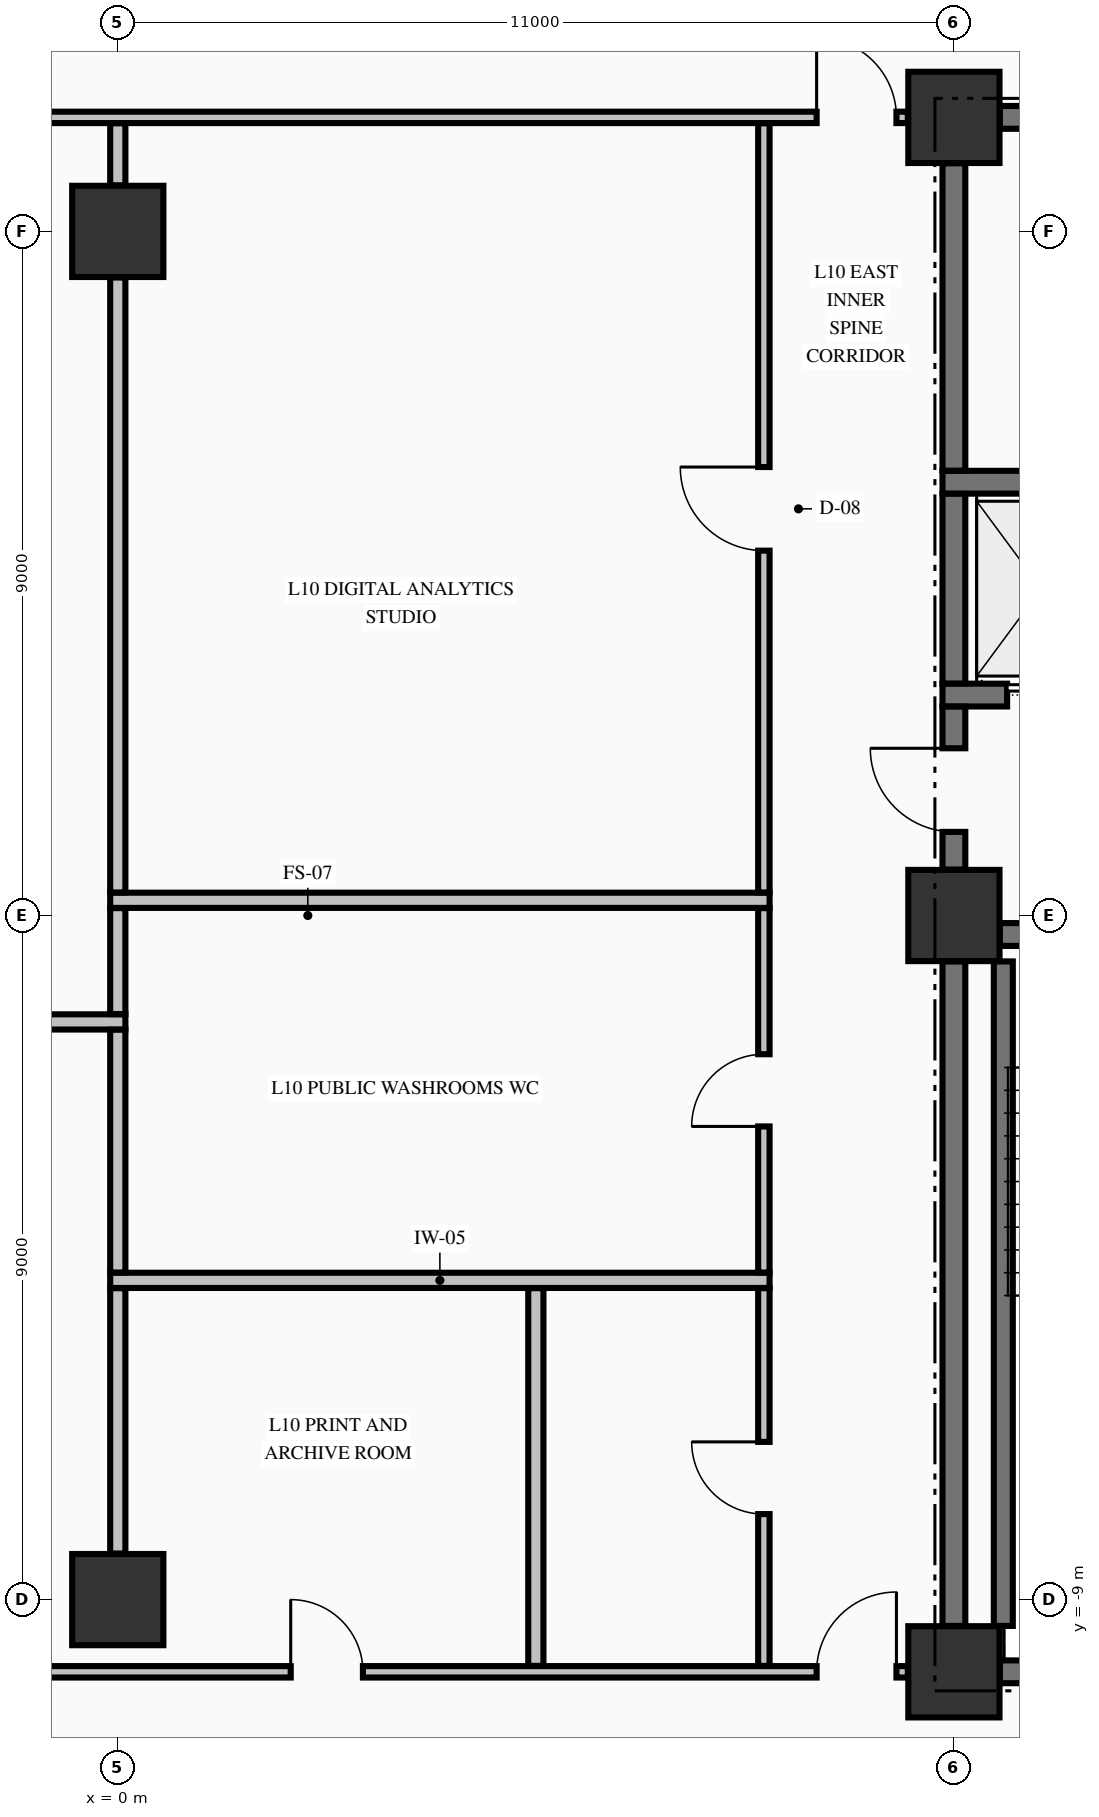
"""IFC4 building model, lengths in metres.
Left out: names, types, materials, properties, quantities, classifications, styles, units other than length and angle.
Written with IfcOpenShell. Run it as: python <this file> out.ifc"""

import sys

from ifc_helpers import new_model, si_unit, direction, frame, frame_2d, origin, origin_2d, place, context, subcontext, project, spatial, rectangle, extrude, element, fill, save


model = new_model("IFC4")
c1 = context("Model", 3, precision=1e-05, world=origin(), true_north=direction((0.0, 1.0)))
c2 = subcontext(c1, "Body", "Model", "MODEL_VIEW")
j1 = project(units=[si_unit("LENGTHUNIT", "METRE"), si_unit("PLANEANGLEUNIT", "RADIAN")], contexts=[c1])
p1 = place(None, origin())
s1 = spatial("IfcSite", under=j1, at=p1, CompositionType="ELEMENT")
p2 = place(p1, origin())
s2 = spatial("IfcBuilding", under=s1, at=p2, CompositionType="ELEMENT")
p3 = place(p2, frame((0.0, 0.0, 45.05)))
s3 = spatial("IfcBuildingStorey", under=s2, at=p3, CompositionType="ELEMENT", Elevation=45.05)
for number, where, z_axis, x_axis in (
    (1, (11.0, -9.95, -0.25), (0.0, 0.0, 1.0), (1.0, 0.0, 0.0)),
    (2, (11.0, 0.0, -0.25), (0.0, 0.0, 1.0), (1.0, 0.0, 0.0)),
    (3, (11.0, 10.5, -0.25), (0.0, 0.0, 1.0), (1.0, 0.0, 0.0)),
    (4, (0.0, -9.0, -0.25), (0.0, 0.0, 1.0), (1.0, 0.0, 0.0)),
    (5, (0.0, 9.0, -0.25), (0.0, 0.0, 1.0), (1.0, 0.0, 0.0)),
):
    element("IfcColumn", number, at=place(p3, frame(where, z_axis=z_axis, x_axis=x_axis)), inside=s3, PredefinedType="COLUMN", context=c2, shape_type="SweptSolid", body=[
        extrude(rectangle(XDim=1.2, YDim=1.2, at=origin_2d()), origin(), (0.0, 0.0, 1.0), 3.57),
    ])
p4 = place(p3, frame((11.604, -9.95, 0.0), z_axis=(0.0, 0.0, 1.0), x_axis=(1.0, 0.0, 0.0)))
e6 = element("IfcWall", 6, at=p4, inside=s3, PredefinedType="SHEAR", context=c2, shape_type="SweptSolid", body=[
    extrude(rectangle(XDim=3.096, YDim=0.3, at=frame_2d((1.548, 0.0))), origin(), (0.0, 0.0, 1.0), 3.32),
])
p5 = place(p3, frame((11.604, -0.25, 0.0), z_axis=(0.0, 0.0, 1.0), x_axis=(1.0, 0.0, 0.0)))
e7 = element("IfcWall", 7, at=p5, inside=s3, PredefinedType="SHEAR", context=c2, shape_type="SweptSolid", body=[
    extrude(rectangle(XDim=3.271, YDim=0.3, at=frame_2d((1.635, 0.0))), origin(), (0.0, 0.0, 1.0), 3.32),
])
p6 = place(p5, frame((0.996, 0.0, 0.0)))
e8 = element("IfcOpeningElement", 8, at=p6, cuts=e7, PredefinedType="OPENING", context=c2, shape_type="SweptSolid", body=[
    extrude(rectangle(XDim=1.1, YDim=2.15, at=frame_2d((0.55, 1.075))), frame((0.0, 0.16, 0.0), z_axis=(0.0, -1.0, 0.0), x_axis=(1.0, 0.0, 0.0)), (0.0, 0.0, 1.0), 0.32),
])
p7 = place(p3, frame((10.85, 2.9, 0.0), z_axis=(0.0, 0.0, 1.0), x_axis=(1.0, 0.0, 0.0)))
e9 = element("IfcWall", 9, at=p7, inside=s3, PredefinedType="SHEAR", context=c2, shape_type="SweptSolid", body=[
    extrude(rectangle(XDim=4.025, YDim=0.3, at=frame_2d((2.012, 0.0))), origin(), (0.0, 0.0, 1.0), 3.32),
])
p8 = place(p7, frame((0.85, 0.0, 0.0)))
e10 = element("IfcOpeningElement", 10, at=p8, cuts=e9, PredefinedType="OPENING", context=c2, shape_type="SweptSolid", body=[
    extrude(rectangle(XDim=1.1, YDim=2.2, at=frame_2d((0.55, 1.1))), frame((0.0, 0.16, 0.0), z_axis=(0.0, -1.0, 0.0), x_axis=(1.0, 0.0, 0.0)), (0.0, 0.0, 1.0), 0.32),
])
p9 = place(p3, frame((10.85, 5.7, 0.0), z_axis=(0.0, 0.0, 1.0), x_axis=(1.0, 0.0, 0.0)))
e11 = element("IfcWall", 11, at=p9, inside=s3, PredefinedType="SHEAR", context=c2, shape_type="SweptSolid", body=[
    extrude(rectangle(XDim=4.025, YDim=0.3, at=frame_2d((2.012, 0.0))), origin(), (0.0, 0.0, 1.0), 3.32),
])
p10 = place(p3, frame((11.604, 10.5, 0.0), z_axis=(0.0, 0.0, 1.0), x_axis=(1.0, 0.0, 0.0)))
e12 = element("IfcWall", 12, at=p10, inside=s3, PredefinedType="SHEAR", context=c2, shape_type="SweptSolid", body=[
    extrude(rectangle(XDim=3.096, YDim=0.3, at=frame_2d((1.548, 0.0))), origin(), (0.0, 0.0, 1.0), 3.32),
])
p11 = place(p10, frame((1.371, 0.0, 0.0)))
e13 = element("IfcOpeningElement", 13, at=p11, cuts=e12, PredefinedType="OPENING", context=c2, shape_type="SweptSolid", body=[
    extrude(rectangle(XDim=0.95, YDim=2.15, at=frame_2d((0.475, 1.075))), frame((0.0, 0.16, 0.0), z_axis=(0.0, -1.0, 0.0), x_axis=(1.0, 0.0, 0.0)), (0.0, 0.0, 1.0), 0.32),
])
p12 = place(p3, frame((-10.394, -9.95, 0.0), z_axis=(0.0, 0.0, 1.0), x_axis=(1.0, 0.0, 0.0)))
e14 = element("IfcWall", 14, at=p12, inside=s3, PredefinedType="PARTITIONING", context=c2, shape_type="SweptSolid", body=[
    extrude(rectangle(XDim=20.788, YDim=0.15, at=frame_2d((10.394, 0.0))), origin(), (0.0, 0.0, 1.0), 3.32),
])
p13 = place(p12, frame((0.15, 0.0, 0.0)))
e15 = element("IfcOpeningElement", 15, at=p13, cuts=e14, PredefinedType="OPENING", context=c2, shape_type="SweptSolid", body=[
    extrude(rectangle(XDim=1.05, YDim=2.15, at=frame_2d((0.525, 1.075))), frame((0.0, 0.085, 0.0), z_axis=(0.0, -1.0, 0.0), x_axis=(1.0, 0.0, 0.0)), (0.0, 0.0, 1.0), 0.17),
])
p14 = place(p12, frame((19.588, 0.0, 0.0)))
e16 = element("IfcOpeningElement", 16, at=p14, cuts=e14, PredefinedType="OPENING", context=c2, shape_type="SweptSolid", body=[
    extrude(rectangle(XDim=1.05, YDim=2.15, at=frame_2d((0.525, 1.075))), frame((0.0, 0.085, 0.0), z_axis=(0.0, -1.0, 0.0), x_axis=(1.0, 0.0, 0.0)), (0.0, 0.0, 1.0), 0.17),
])
p15 = place(p12, frame((12.669, 0.0, 0.0)))
e17 = element("IfcOpeningElement", 17, at=p15, cuts=e14, PredefinedType="OPENING", context=c2, shape_type="SweptSolid", body=[
    extrude(rectangle(XDim=0.95, YDim=2.15, at=frame_2d((0.475, 1.075))), frame((0.0, 0.085, 0.0), z_axis=(0.0, -1.0, 0.0), x_axis=(1.0, 0.0, 0.0)), (0.0, 0.0, 1.0), 0.17),
])
for number, where, z_axis, x_axis in (
    (18, (-0.1, -4.8, 0.0), (0.0, 0.0, 1.0), (1.0, 0.0, 0.0)),
    (19, (-8.575, -1.4, 0.0), (0.0, 0.0, 1.0), (1.0, 0.0, 0.0)),
    (20, (-0.1, 0.2, 0.0), (0.0, 0.0, 1.0), (1.0, 0.0, 0.0)),
):
    element("IfcWall", number, at=place(p3, frame(where, z_axis=z_axis, x_axis=x_axis)), inside=s3, PredefinedType="PARTITIONING", context=c2, shape_type="SweptSolid", body=[
        extrude(rectangle(XDim=8.675, YDim=0.2, at=frame_2d((4.337, 0.0))), origin(), (0.0, 0.0, 1.0), 3.32),
    ])
p16 = place(p3, frame((-10.394, 10.5, 0.0), z_axis=(0.0, 0.0, 1.0), x_axis=(1.0, 0.0, 0.0)))
e21 = element("IfcWall", 21, at=p16, inside=s3, PredefinedType="PARTITIONING", context=c2, shape_type="SweptSolid", body=[
    extrude(rectangle(XDim=20.788, YDim=0.15, at=frame_2d((10.394, 0.0))), origin(), (0.0, 0.0, 1.0), 3.32),
])
p17 = place(p16, frame((0.15, 0.0, 0.0)))
e22 = element("IfcOpeningElement", 22, at=p17, cuts=e21, PredefinedType="OPENING", context=c2, shape_type="SweptSolid", body=[
    extrude(rectangle(XDim=1.05, YDim=2.15, at=frame_2d((0.525, 1.075))), frame((0.0, 0.085, 0.0), z_axis=(0.0, -1.0, 0.0), x_axis=(1.0, 0.0, 0.0)), (0.0, 0.0, 1.0), 0.17),
])
p18 = place(p16, frame((19.588, 0.0, 0.0)))
e23 = element("IfcOpeningElement", 23, at=p18, cuts=e21, PredefinedType="OPENING", context=c2, shape_type="SweptSolid", body=[
    extrude(rectangle(XDim=1.05, YDim=2.15, at=frame_2d((0.525, 1.075))), frame((0.0, 0.085, 0.0), z_axis=(0.0, -1.0, 0.0), x_axis=(1.0, 0.0, 0.0)), (0.0, 0.0, 1.0), 0.17),
])
p19 = place(p3, frame((11.0, -9.346, 0.0), z_axis=(0.0, 0.0, 1.0), x_axis=(0.0, 1.0, 0.0)))
e24 = element("IfcWall", 24, at=p19, inside=s3, PredefinedType="SHEAR", context=c2, shape_type="SweptSolid", body=[
    extrude(rectangle(XDim=8.742, YDim=0.3, at=frame_2d((4.371, 0.0))), origin(), (0.0, 0.0, 1.0), 3.32),
])
p20 = place(p3, frame((11.0, 0.604, 0.0), z_axis=(0.0, 0.0, 1.0), x_axis=(0.0, 1.0, 0.0)))
e25 = element("IfcWall", 25, at=p20, inside=s3, PredefinedType="SHEAR", context=c2, shape_type="SweptSolid", body=[
    extrude(rectangle(XDim=2.144, YDim=0.3, at=frame_2d((1.072, 0.0))), origin(), (0.0, 0.0, 1.0), 3.32),
])
p21 = place(p20, frame((0.496, 0.0, 0.0)))
e26 = element("IfcOpeningElement", 26, at=p21, cuts=e25, PredefinedType="OPENING", context=c2, shape_type="SweptSolid", body=[
    extrude(rectangle(XDim=1.1, YDim=2.15, at=frame_2d((0.55, 1.075))), frame((0.0, 0.16, 0.0), z_axis=(0.0, -1.0, 0.0), x_axis=(1.0, 0.0, 0.0)), (0.0, 0.0, 1.0), 0.32),
])
p22 = place(p3, frame((11.0, 3.052, 0.0), z_axis=(0.0, 0.0, 1.0), x_axis=(0.0, 1.0, 0.0)))
e27 = element("IfcWall", 27, at=p22, inside=s3, PredefinedType="SHEAR", context=c2, shape_type="SweptSolid", body=[
    extrude(rectangle(XDim=2.496, YDim=0.3, at=frame_2d((1.248, 0.0))), origin(), (0.0, 0.0, 1.0), 3.32),
])
p23 = place(p3, frame((11.0, 5.852, 0.0), z_axis=(0.0, 0.0, 1.0), x_axis=(0.0, 1.0, 0.0)))
e28 = element("IfcWall", 28, at=p23, inside=s3, PredefinedType="SHEAR", context=c2, shape_type="SweptSolid", body=[
    extrude(rectangle(XDim=4.044, YDim=0.3, at=frame_2d((2.022, 0.0))), origin(), (0.0, 0.0, 1.0), 3.32),
])
p24 = place(p3, frame((11.65, -9.346, 0.0), z_axis=(0.0, 0.0, 1.0), x_axis=(0.0, 1.0, 0.0)))
e29 = element("IfcWall", 29, at=p24, inside=s3, PredefinedType="SOLIDWALL", context=c2, shape_type="SweptSolid", body=[
    extrude(rectangle(XDim=8.742, YDim=0.25, at=frame_2d((4.371, 0.0))), origin(), (0.0, 0.0, 1.0), 3.32),
])
p25 = place(p3, frame((0.0, -8.394, 0.0), z_axis=(0.0, 0.0, 1.0), x_axis=(0.0, 1.0, 0.0)))
e30 = element("IfcWall", 30, at=p25, inside=s3, PredefinedType="PARTITIONING", context=c2, shape_type="SweptSolid", body=[
    extrude(rectangle(XDim=3.491, YDim=0.2, at=frame_2d((1.746, 0.0))), origin(), (0.0, 0.0, 1.0), 2.66),
])
p26 = place(p3, frame((0.0, -4.697, 0.0), z_axis=(0.0, 0.0, 1.0), x_axis=(0.0, 1.0, 0.0)))
e31 = element("IfcWall", 31, at=p26, inside=s3, PredefinedType="PARTITIONING", context=c2, shape_type="SweptSolid", body=[
    extrude(rectangle(XDim=3.194, YDim=0.2, at=frame_2d((1.597, 0.0))), origin(), (0.0, 0.0, 1.0), 2.66),
])
p27 = place(p3, frame((0.0, -1.297, 0.0), z_axis=(0.0, 0.0, 1.0), x_axis=(0.0, 1.0, 0.0)))
e32 = element("IfcWall", 32, at=p27, inside=s3, PredefinedType="PARTITIONING", context=c2, shape_type="SweptSolid", body=[
    extrude(rectangle(XDim=1.394, YDim=0.2, at=frame_2d((0.697, 0.0))), origin(), (0.0, 0.0, 1.0), 2.66),
])
p28 = place(p3, frame((0.0, 0.303, 0.0), z_axis=(0.0, 0.0, 1.0), x_axis=(0.0, 1.0, 0.0)))
e33 = element("IfcWall", 33, at=p28, inside=s3, PredefinedType="PARTITIONING", context=c2, shape_type="SweptSolid", body=[
    extrude(rectangle(XDim=8.091, YDim=0.2, at=frame_2d((4.045, 0.0))), origin(), (0.0, 0.0, 1.0), 2.66),
])
p29 = place(p3, frame((0.0, 9.606, 0.0), z_axis=(0.0, 0.0, 1.0), x_axis=(0.0, 1.0, 0.0)))
e34 = element("IfcWall", 34, at=p29, inside=s3, PredefinedType="PARTITIONING", context=c2, shape_type="SweptSolid", body=[
    extrude(rectangle(XDim=0.816, YDim=0.2, at=frame_2d((0.408, 0.0))), origin(), (0.0, 0.0, 1.0), 2.66),
])
p30 = place(p3, frame((5.5, -9.872, 0.0), z_axis=(0.0, 0.0, 1.0), x_axis=(0.0, 1.0, 0.0)))
e35 = element("IfcWall", 35, at=p30, inside=s3, PredefinedType="PARTITIONING", context=c2, shape_type="SweptSolid", body=[
    extrude(rectangle(XDim=4.969, YDim=0.2, at=frame_2d((2.484, 0.0))), origin(), (0.0, 0.0, 1.0), 3.32),
])
p31 = place(p3, frame((8.5, -9.872, 0.0), z_axis=(0.0, 0.0, 1.0), x_axis=(0.0, 1.0, 0.0)))
e36 = element("IfcWall", 36, at=p31, inside=s3, PredefinedType="PARTITIONING", context=c2, shape_type="SweptSolid", body=[
    extrude(rectangle(XDim=4.969, YDim=0.15, at=frame_2d((2.484, 0.0))), origin(), (0.0, 0.0, 1.0), 3.32),
])
p32 = place(p31, frame((1.997, 0.0, 0.0)))
e37 = element("IfcOpeningElement", 37, at=p32, cuts=e36, PredefinedType="OPENING", context=c2, shape_type="SweptSolid", body=[
    extrude(rectangle(XDim=0.95, YDim=2.15, at=frame_2d((0.475, 1.075))), frame((0.0, 0.085, 0.0), z_axis=(0.0, -1.0, 0.0), x_axis=(1.0, 0.0, 0.0)), (0.0, 0.0, 1.0), 0.17),
])
p33 = place(p3, frame((8.5, -4.697, 0.0), z_axis=(0.0, 0.0, 1.0), x_axis=(0.0, 1.0, 0.0)))
e38 = element("IfcWall", 38, at=p33, inside=s3, PredefinedType="PARTITIONING", context=c2, shape_type="SweptSolid", body=[
    extrude(rectangle(XDim=4.794, YDim=0.15, at=frame_2d((2.397, 0.0))), origin(), (0.0, 0.0, 1.0), 3.32),
])
p34 = place(p33, frame((1.922, 0.0, 0.0)))
e39 = element("IfcOpeningElement", 39, at=p34, cuts=e38, PredefinedType="OPENING", context=c2, shape_type="SweptSolid", body=[
    extrude(rectangle(XDim=0.95, YDim=2.15, at=frame_2d((0.475, 1.075))), frame((0.0, 0.085, 0.0), z_axis=(0.0, -1.0, 0.0), x_axis=(1.0, 0.0, 0.0)), (0.0, 0.0, 1.0), 0.17),
])
p35 = place(p3, frame((8.5, 0.303, 0.0), z_axis=(0.0, 0.0, 1.0), x_axis=(0.0, 1.0, 0.0)))
e40 = element("IfcWall", 40, at=p35, inside=s3, PredefinedType="PARTITIONING", context=c2, shape_type="SweptSolid", body=[
    extrude(rectangle(XDim=10.119, YDim=0.15, at=frame_2d((5.06, 0.0))), origin(), (0.0, 0.0, 1.0), 3.32),
])
p36 = place(p35, frame((4.497, 0.0, 0.0)))
e41 = element("IfcOpeningElement", 41, at=p36, cuts=e40, PredefinedType="OPENING", context=c2, shape_type="SweptSolid", body=[
    extrude(rectangle(XDim=1.1, YDim=2.15, at=frame_2d((0.55, 1.075))), frame((0.0, 0.085, 0.0), z_axis=(0.0, -1.0, 0.0), x_axis=(1.0, 0.0, 0.0)), (0.0, 0.0, 1.0), 0.17),
])
p37 = place(p21, origin())
e42 = element("IfcDoor", 42, at=p37, inside=s3, OperationType="SINGLE_SWING_RIGHT", PredefinedType="DOOR", context=c2, shape_type="SweptSolid", body=[
    extrude(rectangle(XDim=1.1, YDim=2.15, at=frame_2d((0.55, 1.075))), frame((0.0, 0.025, 0.0), z_axis=(0.0, -1.0, 0.0), x_axis=(1.0, 0.0, 0.0)), (0.0, 0.0, 1.0), 0.05),
])
fill(e26, e42)
p38 = place(p8, origin())
e43 = element("IfcDoor", 43, at=p38, inside=s3, OperationType="SLIDING_TO_RIGHT", PredefinedType="DOOR", context=c2, shape_type="SweptSolid", body=[
    extrude(rectangle(XDim=1.1, YDim=2.2, at=frame_2d((0.55, 1.1))), frame((0.0, 0.025, 0.0), z_axis=(0.0, -1.0, 0.0), x_axis=(1.0, 0.0, 0.0)), (0.0, 0.0, 1.0), 0.05),
])
fill(e10, e43)
p39 = place(p18, origin())
e44 = element("IfcDoor", 44, at=p39, inside=s3, OperationType="SINGLE_SWING_LEFT", PredefinedType="DOOR", context=c2, shape_type="SweptSolid", body=[
    extrude(rectangle(XDim=1.05, YDim=2.15, at=frame_2d((0.525, 1.075))), frame((0.0, 0.025, 0.0), z_axis=(0.0, -1.0, 0.0), x_axis=(1.0, 0.0, 0.0)), (0.0, 0.0, 1.0), 0.05),
])
fill(e23, e44)
p40 = place(p14, origin())
e45 = element("IfcDoor", 45, at=p40, inside=s3, OperationType="SINGLE_SWING_RIGHT", PredefinedType="DOOR", context=c2, shape_type="SweptSolid", body=[
    extrude(rectangle(XDim=1.05, YDim=2.15, at=frame_2d((0.525, 1.075))), frame((0.0, 0.025, 0.0), z_axis=(0.0, -1.0, 0.0), x_axis=(1.0, 0.0, 0.0)), (0.0, 0.0, 1.0), 0.05),
])
fill(e16, e45)
p41 = place(p36, origin())
e46 = element("IfcDoor", 46, at=p41, inside=s3, OperationType="SINGLE_SWING_RIGHT", PredefinedType="DOOR", context=c2, shape_type="SweptSolid", body=[
    extrude(rectangle(XDim=1.1, YDim=2.15, at=frame_2d((0.55, 1.075))), frame((0.0, 0.025, 0.0), z_axis=(0.0, -1.0, 0.0), x_axis=(1.0, 0.0, 0.0)), (0.0, 0.0, 1.0), 0.05),
])
fill(e41, e46)
p42 = place(p34, origin())
e47 = element("IfcDoor", 47, at=p42, inside=s3, OperationType="SINGLE_SWING_LEFT", PredefinedType="DOOR", context=c2, shape_type="SweptSolid", body=[
    extrude(rectangle(XDim=0.95, YDim=2.15, at=frame_2d((0.475, 1.075))), frame((0.0, 0.025, 0.0), z_axis=(0.0, -1.0, 0.0), x_axis=(1.0, 0.0, 0.0)), (0.0, 0.0, 1.0), 0.05),
])
fill(e39, e47)
p43 = place(p32, origin())
e48 = element("IfcDoor", 48, at=p43, inside=s3, OperationType="SINGLE_SWING_RIGHT", PredefinedType="DOOR", context=c2, shape_type="SweptSolid", body=[
    extrude(rectangle(XDim=0.95, YDim=2.15, at=frame_2d((0.475, 1.075))), frame((0.0, 0.025, 0.0), z_axis=(0.0, -1.0, 0.0), x_axis=(1.0, 0.0, 0.0)), (0.0, 0.0, 1.0), 0.05),
])
fill(e37, e48)
p44 = place(p15, origin())
e49 = element("IfcDoor", 49, at=p44, inside=s3, OperationType="SINGLE_SWING_LEFT", PredefinedType="DOOR", context=c2, shape_type="SweptSolid", body=[
    extrude(rectangle(XDim=0.95, YDim=2.15, at=frame_2d((0.475, 1.075))), frame((0.0, 0.025, 0.0), z_axis=(0.0, -1.0, 0.0), x_axis=(1.0, 0.0, 0.0)), (0.0, 0.0, 1.0), 0.05),
])
fill(e17, e49)
save(model, sys.argv[1])
